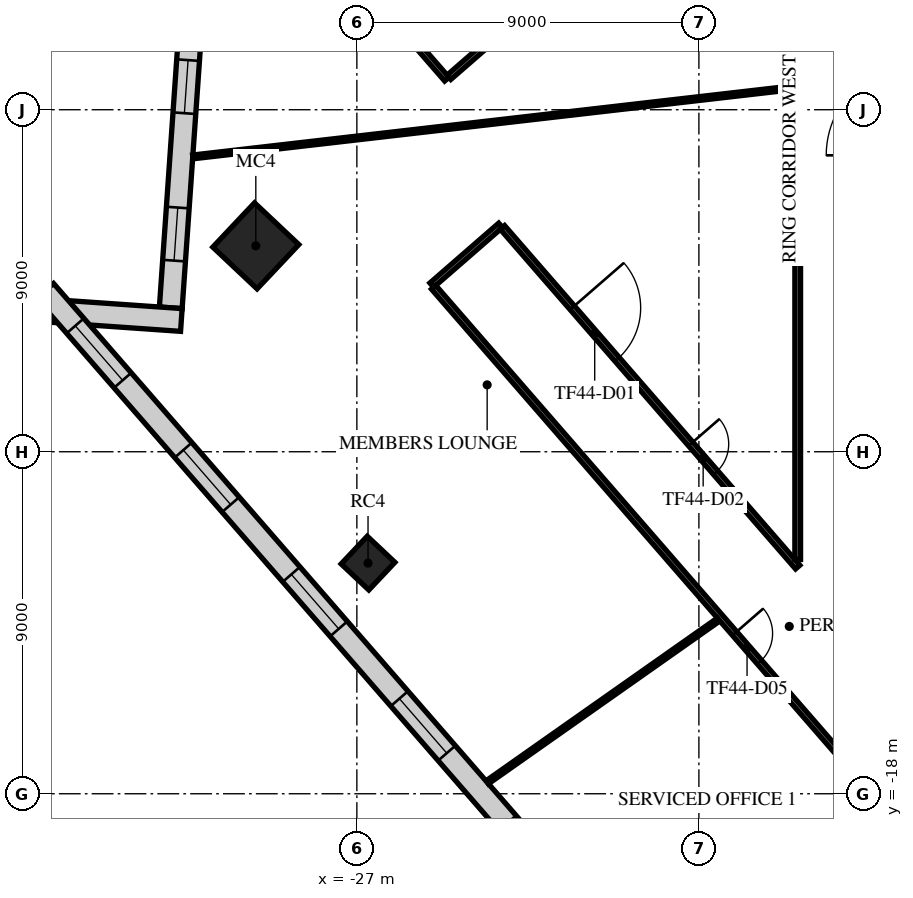
"""IFC4 building model, lengths in metres.
Left out: names, types, materials, properties, quantities, classifications, styles, units other than length and angle.
Written with IfcOpenShell. Run it as: python <this file> out.ifc"""

import sys

from ifc_helpers import new_model, si_unit, direction, frame, frame_2d, origin, origin_2d, place, context, subcontext, project, spatial, rectangle, extrude, element, fill, save


model = new_model("IFC4")
c1 = context("Model", 3, precision=1e-05, world=origin(), true_north=direction((0.0, 1.0)))
c2 = subcontext(c1, "Body", "Model", "MODEL_VIEW")
j1 = project(units=[si_unit("LENGTHUNIT", "METRE"), si_unit("PLANEANGLEUNIT", "RADIAN")], contexts=[c1])
p1 = place(None, origin())
s1 = spatial("IfcSite", under=j1, at=p1, CompositionType="ELEMENT")
p2 = place(p1, origin())
s2 = spatial("IfcBuilding", under=s1, at=p2, CompositionType="ELEMENT")
p3 = place(p2, frame((0.0, 0.0, 193.3)))
s3 = spatial("IfcBuildingStorey", under=s2, at=p3, CompositionType="ELEMENT", Elevation=193.3)
p4 = place(p3, frame((-29.659, -3.582, 0.0), z_axis=(0.0, 0.0, 1.0), x_axis=(0.685916152371, 0.727680583715, 0.0)))
e1 = element("IfcColumn", 1, at=p4, inside=s3, PredefinedType="COLUMN", context=c2, shape_type="SweptSolid", body=[
    extrude(rectangle(XDim=1.6, YDim=1.6, at=origin_2d()), origin(), (0.0, 0.0, 1.0), 4.0),
])
p5 = place(p3, frame((-26.706, -11.931, 0.0), z_axis=(0.0, 0.0, 1.0), x_axis=(0.685916152371, 0.727680583715, 0.0)))
e2 = element("IfcColumn", 2, at=p5, inside=s3, PredefinedType="COLUMN", context=c2, shape_type="SweptSolid", body=[
    extrude(rectangle(XDim=1.0, YDim=1.0, at=origin_2d()), origin(), (0.0, 0.0, 1.0), 4.0),
])
p6 = place(p3, frame((-31.354, 2.547, 0.0), z_axis=(0.0, 0.0, 1.0), x_axis=(-0.069743544409, -0.997564954283, 0.0)))
e3 = element("IfcWall", 3, at=p6, inside=s3, PredefinedType="STANDARD", context=c2, shape_type="SweptSolid", body=[
    extrude(rectangle(XDim=7.778, YDim=0.6, at=frame_2d((3.889, 0.0))), origin(), (0.0, 0.0, 1.0), 3.62),
])
p7 = place(p6, frame((1.244, 0.0, 0.9)))
e4 = element("IfcOpeningElement", 4, at=p7, cuts=e3, PredefinedType="OPENING", context=c2, shape_type="SweptSolid", body=[
    extrude(rectangle(XDim=1.4, YDim=2.1, at=frame_2d((0.7, 1.05))), frame((0.0, 0.31, 0.0), z_axis=(0.0, -1.0, 0.0), x_axis=(1.0, 0.0, 0.0)), (0.0, 0.0, 1.0), 0.62),
])
p8 = place(p6, frame((5.134, 0.0, 0.9)))
e5 = element("IfcOpeningElement", 5, at=p8, cuts=e3, PredefinedType="OPENING", context=c2, shape_type="SweptSolid", body=[
    extrude(rectangle(XDim=1.4, YDim=2.1, at=frame_2d((0.7, 1.05))), frame((0.0, 0.31, 0.0), z_axis=(0.0, -1.0, 0.0), x_axis=(1.0, 0.0, 0.0)), (0.0, 0.0, 1.0), 0.62),
])
p9 = place(p3, frame((-31.618, -5.532, 0.0), z_axis=(0.0, 0.0, 1.0), x_axis=(-0.997563916762, 0.069758382828, 0.0)))
e6 = element("IfcWall", 6, at=p9, inside=s3, PredefinedType="STANDARD", context=c2, shape_type="SweptSolid", body=[
    extrude(rectangle(XDim=3.846, YDim=0.6, at=frame_2d((1.923, 0.0))), origin(), (0.0, 0.0, 1.0), 3.62),
])
p10 = place(p3, frame((-35.208, -4.768, 0.0), z_axis=(0.0, 0.0, 1.0), x_axis=(0.656058749455, -0.754709823219, 0.0)))
e7 = element("IfcWall", 7, at=p10, inside=s3, PredefinedType="STANDARD", context=c2, shape_type="SweptSolid", body=[
    extrude(rectangle(XDim=39.0, YDim=0.6, at=frame_2d((19.5, 0.0))), origin(), (0.0, 0.0, 1.0), 3.62),
])
p11 = place(p10, frame((1.217, 0.0, 0.9)))
e8 = element("IfcOpeningElement", 8, at=p11, cuts=e7, PredefinedType="OPENING", context=c2, shape_type="SweptSolid", body=[
    extrude(rectangle(XDim=1.9, YDim=2.1, at=frame_2d((0.95, 1.05))), frame((0.0, 0.31, 0.0), z_axis=(0.0, -1.0, 0.0), x_axis=(1.0, 0.0, 0.0)), (0.0, 0.0, 1.0), 0.62),
])
p12 = place(p10, frame((5.55, 0.0, 0.9)))
e9 = element("IfcOpeningElement", 9, at=p12, cuts=e7, PredefinedType="OPENING", context=c2, shape_type="SweptSolid", body=[
    extrude(rectangle(XDim=1.9, YDim=2.1, at=frame_2d((0.95, 1.05))), frame((0.0, 0.31, 0.0), z_axis=(0.0, -1.0, 0.0), x_axis=(1.0, 0.0, 0.0)), (0.0, 0.0, 1.0), 0.62),
])
p13 = place(p10, frame((9.883, 0.0, 0.9)))
e10 = element("IfcOpeningElement", 10, at=p13, cuts=e7, PredefinedType="OPENING", context=c2, shape_type="SweptSolid", body=[
    extrude(rectangle(XDim=1.9, YDim=2.1, at=frame_2d((0.95, 1.05))), frame((0.0, 0.31, 0.0), z_axis=(0.0, -1.0, 0.0), x_axis=(1.0, 0.0, 0.0)), (0.0, 0.0, 1.0), 0.62),
])
p14 = place(p10, frame((14.217, 0.0, 0.9)))
e11 = element("IfcOpeningElement", 11, at=p14, cuts=e7, PredefinedType="OPENING", context=c2, shape_type="SweptSolid", body=[
    extrude(rectangle(XDim=1.9, YDim=2.1, at=frame_2d((0.95, 1.05))), frame((0.0, 0.31, 0.0), z_axis=(0.0, -1.0, 0.0), x_axis=(1.0, 0.0, 0.0)), (0.0, 0.0, 1.0), 0.62),
])
p15 = place(p10, frame((18.55, 0.0, 0.9)))
e12 = element("IfcOpeningElement", 12, at=p15, cuts=e7, PredefinedType="OPENING", context=c2, shape_type="SweptSolid", body=[
    extrude(rectangle(XDim=1.9, YDim=2.1, at=frame_2d((0.95, 1.05))), frame((0.0, 0.31, 0.0), z_axis=(0.0, -1.0, 0.0), x_axis=(1.0, 0.0, 0.0)), (0.0, 0.0, 1.0), 0.62),
])
p16 = place(p10, frame((22.883, 0.0, 0.9)))
e13 = element("IfcOpeningElement", 13, at=p16, cuts=e7, PredefinedType="OPENING", context=c2, shape_type="SweptSolid", body=[
    extrude(rectangle(XDim=1.9, YDim=2.1, at=frame_2d((0.95, 1.05))), frame((0.0, 0.31, 0.0), z_axis=(0.0, -1.0, 0.0), x_axis=(1.0, 0.0, 0.0)), (0.0, 0.0, 1.0), 0.62),
])
p17 = place(p10, frame((27.217, 0.0, 0.9)))
e14 = element("IfcOpeningElement", 14, at=p17, cuts=e7, PredefinedType="OPENING", context=c2, shape_type="SweptSolid", body=[
    extrude(rectangle(XDim=1.9, YDim=2.1, at=frame_2d((0.95, 1.05))), frame((0.0, 0.31, 0.0), z_axis=(0.0, -1.0, 0.0), x_axis=(1.0, 0.0, 0.0)), (0.0, 0.0, 1.0), 0.62),
])
p18 = place(p10, frame((31.55, 0.0, 0.9)))
e15 = element("IfcOpeningElement", 15, at=p18, cuts=e7, PredefinedType="OPENING", context=c2, shape_type="SweptSolid", body=[
    extrude(rectangle(XDim=1.9, YDim=2.1, at=frame_2d((0.95, 1.05))), frame((0.0, 0.31, 0.0), z_axis=(0.0, -1.0, 0.0), x_axis=(1.0, 0.0, 0.0)), (0.0, 0.0, 1.0), 0.62),
])
p19 = place(p10, frame((35.883, 0.0, 0.9)))
e16 = element("IfcOpeningElement", 16, at=p19, cuts=e7, PredefinedType="OPENING", context=c2, shape_type="SweptSolid", body=[
    extrude(rectangle(XDim=1.9, YDim=2.1, at=frame_2d((0.95, 1.05))), frame((0.0, 0.31, 0.0), z_axis=(0.0, -1.0, 0.0), x_axis=(1.0, 0.0, 0.0)), (0.0, 0.0, 1.0), 0.62),
])
p20 = place(p3, frame((-26.159, 2.559, 0.0), z_axis=(0.0, 0.0, 1.0), x_axis=(0.65619691316, -0.754589697226, 0.0)))
e17 = element("IfcWall", 17, at=p20, inside=s3, PredefinedType="PARTITIONING", context=c2, shape_type="SweptSolid", body=[
    extrude(rectangle(XDim=2.325, YDim=0.15, at=frame_2d((1.163, 0.0))), origin(), (0.0, 0.0, 1.0), 3.17),
])
p21 = place(p3, frame((-25.029, -4.616, 0.0), z_axis=(0.0, 0.0, 1.0), x_axis=(0.75457705231, 0.656211453822, 0.0)))
e18 = element("IfcWall", 18, at=p21, inside=s3, PredefinedType="PARTITIONING", context=c2, shape_type="SweptSolid", body=[
    extrude(rectangle(XDim=2.4, YDim=0.15, at=frame_2d((1.2, 0.0))), origin(), (0.0, 0.0, 1.0), 3.17),
])
p22 = place(p3, frame((-24.98, -4.673, 0.0), z_axis=(0.0, 0.0, 1.0), x_axis=(0.656048444225, -0.754718781289, 0.0)))
e19 = element("IfcWall", 19, at=p22, inside=s3, PredefinedType="PARTITIONING", context=c2, shape_type="SweptSolid", body=[
    extrude(rectangle(XDim=25.8, YDim=0.15, at=frame_2d((12.9, 0.0))), origin(), (0.0, 0.0, 1.0), 3.17),
])
p23 = place(p22, frame((12.071, 0.0, 0.0)))
e20 = element("IfcOpeningElement", 20, at=p23, cuts=e19, PredefinedType="OPENING", context=c2, shape_type="SweptSolid", body=[
    extrude(rectangle(XDim=1.0, YDim=2.1, at=frame_2d((0.5, 1.05))), frame((0.0, 0.085, 0.0), z_axis=(0.0, -1.0, 0.0), x_axis=(1.0, 0.0, 0.0)), (0.0, 0.0, 1.0), 0.17),
])
p24 = place(p22, frame((24.318, 0.0, 0.0)))
e21 = element("IfcOpeningElement", 21, at=p24, cuts=e19, PredefinedType="OPENING", context=c2, shape_type="SweptSolid", body=[
    extrude(rectangle(XDim=1.0, YDim=2.1, at=frame_2d((0.5, 1.05))), frame((0.0, 0.085, 0.0), z_axis=(0.0, -1.0, 0.0), x_axis=(1.0, 0.0, 0.0)), (0.0, 0.0, 1.0), 0.17),
])
p25 = place(p3, frame((-24.576, 0.854, 0.0), z_axis=(0.0, 0.0, 1.0), x_axis=(0.75472382762, 0.656042638875, 0.0)))
e22 = element("IfcWall", 22, at=p25, inside=s3, PredefinedType="PARTITIONING", context=c2, shape_type="SweptSolid", body=[
    extrude(rectangle(XDim=11.994, YDim=0.15, at=frame_2d((5.997, 0.0))), origin(), (0.0, 0.0, 1.0), 3.17),
])
p26 = place(p25, frame((6.8, 0.0, 0.0)))
e23 = element("IfcOpeningElement", 23, at=p26, cuts=e22, PredefinedType="OPENING", context=c2, shape_type="SweptSolid", body=[
    extrude(rectangle(XDim=1.8, YDim=2.1, at=frame_2d((0.9, 1.05))), frame((0.0, 0.085, 0.0), z_axis=(0.0, -1.0, 0.0), x_axis=(1.0, 0.0, 0.0)), (0.0, 0.0, 1.0), 0.17),
])
p27 = place(p3, frame((-23.169, -3.098, 0.0), z_axis=(0.0, 0.0, 1.0), x_axis=(0.656047525283, -0.754719580089, 0.0)))
e24 = element("IfcWall", 24, at=p27, inside=s3, PredefinedType="PARTITIONING", context=c2, shape_type="SweptSolid", body=[
    extrude(rectangle(XDim=11.842, YDim=0.15, at=frame_2d((5.921, 0.0))), origin(), (0.0, 0.0, 1.0), 3.17),
])
p28 = place(p27, frame((2.8, 0.0, 0.0)))
e25 = element("IfcOpeningElement", 25, at=p28, cuts=e24, PredefinedType="OPENING", context=c2, shape_type="SweptSolid", body=[
    extrude(rectangle(XDim=1.8, YDim=2.1, at=frame_2d((0.9, 1.05))), frame((0.0, 0.085, 0.0), z_axis=(0.0, -1.0, 0.0), x_axis=(1.0, 0.0, 0.0)), (0.0, 0.0, 1.0), 0.17),
])
p29 = place(p27, frame((7.55, 0.0, 0.0)))
e26 = element("IfcOpeningElement", 26, at=p29, cuts=e24, PredefinedType="OPENING", context=c2, shape_type="SweptSolid", body=[
    extrude(rectangle(XDim=1.0, YDim=2.1, at=frame_2d((0.5, 1.05))), frame((0.0, 0.085, 0.0), z_axis=(0.0, -1.0, 0.0), x_axis=(1.0, 0.0, 0.0)), (0.0, 0.0, 1.0), 0.17),
])
p30 = place(p3, frame((-15.4, -11.834, 0.0), z_axis=(0.0, 0.0, 1.0), x_axis=(0.0, 1.0, 0.0)))
e27 = element("IfcWall", 27, at=p30, inside=s3, PredefinedType="PARTITIONING", context=c2, shape_type="SweptSolid", body=[
    extrude(rectangle(XDim=20.666, YDim=0.15, at=frame_2d((10.333, 0.0))), origin(), (0.0, 0.0, 1.0), 3.17),
])
p31 = place(p3, frame((-31.316, -1.242, 0.0), z_axis=(0.0, 0.0, 1.0), x_axis=(0.993421473136, 0.114515399452, 0.0)))
e28 = element("IfcWall", 28, at=p31, inside=s3, PredefinedType="PARTITIONING", context=c2, shape_type="SweptSolid", body=[
    extrude(rectangle(XDim=15.941, YDim=0.1, at=frame_2d((7.97, 0.0))), origin(), (0.0, 0.0, 1.0), 3.17),
])
p32 = place(p3, frame((-23.568, -17.698, 0.0), z_axis=(0.0, 0.0, 1.0), x_axis=(0.817824726915, 0.575467389212, 0.0)))
e29 = element("IfcWall", 29, at=p32, inside=s3, PredefinedType="PARTITIONING", context=c2, shape_type="SweptSolid", body=[
    extrude(rectangle(XDim=7.438, YDim=0.1, at=frame_2d((3.719, 0.0))), origin(), (0.0, 0.0, 1.0), 3.17),
])
p33 = place(p7, origin())
e30 = element("IfcWindow", 30, at=p33, inside=s3, PartitioningType="SINGLE_PANEL", PredefinedType="WINDOW", context=c2, shape_type="SweptSolid", body=[
    extrude(rectangle(XDim=1.4, YDim=2.1, at=frame_2d((0.7, 1.05))), frame((0.0, 0.03, 0.0), z_axis=(0.0, -1.0, 0.0), x_axis=(1.0, 0.0, 0.0)), (0.0, 0.0, 1.0), 0.06),
])
fill(e4, e30)
p34 = place(p8, origin())
e31 = element("IfcWindow", 31, at=p34, inside=s3, PartitioningType="SINGLE_PANEL", PredefinedType="WINDOW", context=c2, shape_type="SweptSolid", body=[
    extrude(rectangle(XDim=1.4, YDim=2.1, at=frame_2d((0.7, 1.05))), frame((0.0, 0.03, 0.0), z_axis=(0.0, -1.0, 0.0), x_axis=(1.0, 0.0, 0.0)), (0.0, 0.0, 1.0), 0.06),
])
fill(e5, e31)
p35 = place(p11, origin())
e32 = element("IfcWindow", 32, at=p35, inside=s3, PartitioningType="SINGLE_PANEL", PredefinedType="WINDOW", context=c2, shape_type="SweptSolid", body=[
    extrude(rectangle(XDim=1.9, YDim=2.1, at=frame_2d((0.95, 1.05))), frame((0.0, 0.03, 0.0), z_axis=(0.0, -1.0, 0.0), x_axis=(1.0, 0.0, 0.0)), (0.0, 0.0, 1.0), 0.06),
])
fill(e8, e32)
p36 = place(p12, origin())
e33 = element("IfcWindow", 33, at=p36, inside=s3, PartitioningType="SINGLE_PANEL", PredefinedType="WINDOW", context=c2, shape_type="SweptSolid", body=[
    extrude(rectangle(XDim=1.9, YDim=2.1, at=frame_2d((0.95, 1.05))), frame((0.0, 0.03, 0.0), z_axis=(0.0, -1.0, 0.0), x_axis=(1.0, 0.0, 0.0)), (0.0, 0.0, 1.0), 0.06),
])
fill(e9, e33)
p37 = place(p13, origin())
e34 = element("IfcWindow", 34, at=p37, inside=s3, PartitioningType="SINGLE_PANEL", PredefinedType="WINDOW", context=c2, shape_type="SweptSolid", body=[
    extrude(rectangle(XDim=1.9, YDim=2.1, at=frame_2d((0.95, 1.05))), frame((0.0, 0.03, 0.0), z_axis=(0.0, -1.0, 0.0), x_axis=(1.0, 0.0, 0.0)), (0.0, 0.0, 1.0), 0.06),
])
fill(e10, e34)
p38 = place(p14, origin())
e35 = element("IfcWindow", 35, at=p38, inside=s3, PartitioningType="SINGLE_PANEL", PredefinedType="WINDOW", context=c2, shape_type="SweptSolid", body=[
    extrude(rectangle(XDim=1.9, YDim=2.1, at=frame_2d((0.95, 1.05))), frame((0.0, 0.03, 0.0), z_axis=(0.0, -1.0, 0.0), x_axis=(1.0, 0.0, 0.0)), (0.0, 0.0, 1.0), 0.06),
])
fill(e11, e35)
p39 = place(p28, origin())
e36 = element("IfcDoor", 36, at=p39, inside=s3, OperationType="DOUBLE_DOOR_SINGLE_SWING", PredefinedType="DOOR", context=c2, shape_type="SweptSolid", body=[
    extrude(rectangle(XDim=1.8, YDim=2.1, at=frame_2d((0.9, 1.05))), frame((0.0, 0.025, 0.0), z_axis=(0.0, -1.0, 0.0), x_axis=(1.0, 0.0, 0.0)), (0.0, 0.0, 1.0), 0.05),
])
fill(e25, e36)
p40 = place(p29, origin())
e37 = element("IfcDoor", 37, at=p40, inside=s3, OperationType="SINGLE_SWING_RIGHT", PredefinedType="DOOR", context=c2, shape_type="SweptSolid", body=[
    extrude(rectangle(XDim=1.0, YDim=2.1, at=frame_2d((0.5, 1.05))), frame((0.0, 0.025, 0.0), z_axis=(0.0, -1.0, 0.0), x_axis=(1.0, 0.0, 0.0)), (0.0, 0.0, 1.0), 0.05),
])
fill(e26, e37)
p41 = place(p23, frame((1.0, 0.0, 0.0), z_axis=(0.0, 0.0, 1.0), x_axis=(-1.0, 0.0, 0.0)))
e38 = element("IfcDoor", 38, at=p41, inside=s3, OperationType="SINGLE_SWING_LEFT", PredefinedType="DOOR", context=c2, shape_type="SweptSolid", body=[
    extrude(rectangle(XDim=1.0, YDim=2.1, at=frame_2d((0.5, 1.05))), frame((0.0, 0.025, 0.0), z_axis=(0.0, -1.0, 0.0), x_axis=(1.0, 0.0, 0.0)), (0.0, 0.0, 1.0), 0.05),
])
fill(e20, e38)
save(model, sys.argv[1])
